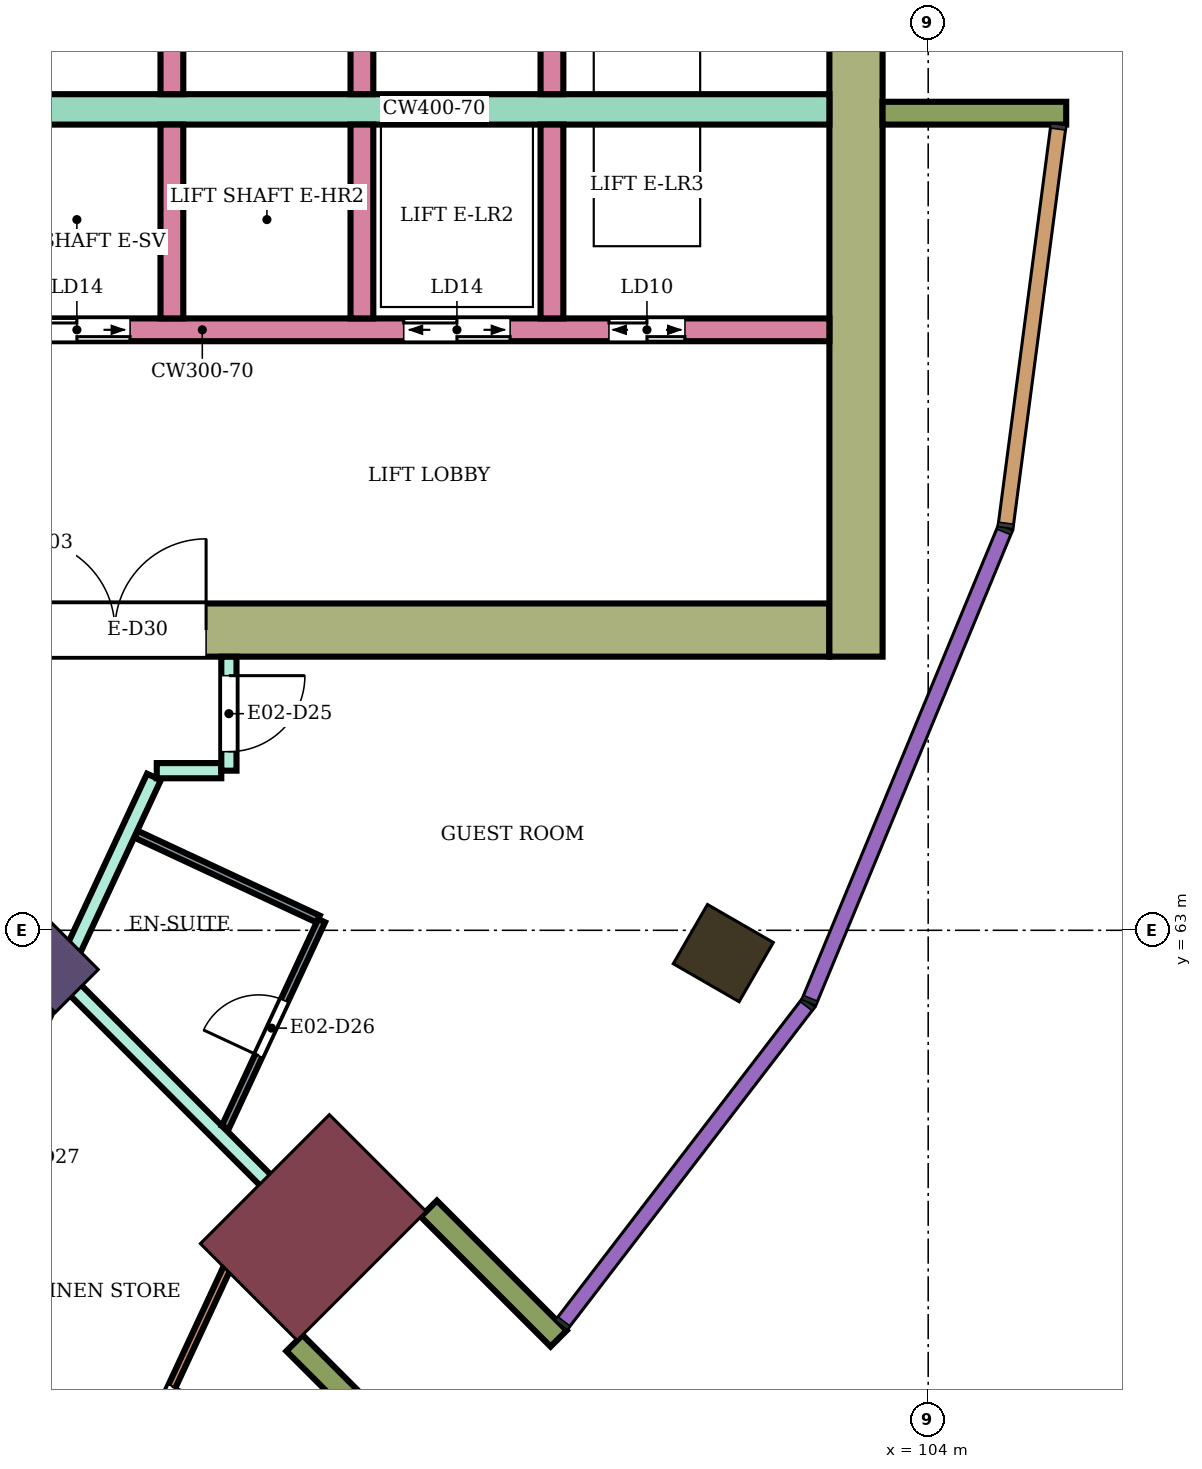
"""IFC4 building model, lengths in metres.
Left out: names, types, materials, properties, quantities, classifications, styles, units other than length and angle.
Written with IfcOpenShell. Run it as: python <this file> out.ifc"""

import sys

from ifc_helpers import new_model, si_unit, direction, frame, frame_2d, origin, origin_2d, place, context, subcontext, project, spatial, rectangle, extrude, element, fill, save


model = new_model("IFC4")
c1 = context("Model", 3, precision=1e-05, world=origin(), true_north=direction((0.0, 1.0)))
c2 = subcontext(c1, "Body", "Model", "MODEL_VIEW")
j1 = project(units=[si_unit("LENGTHUNIT", "METRE"), si_unit("PLANEANGLEUNIT", "RADIAN")], contexts=[c1])
p1 = place(None, origin())
s1 = spatial("IfcSite", under=j1, at=p1, CompositionType="ELEMENT")
p2 = place(p1, origin())
s2 = spatial("IfcBuilding", under=s1, at=p2, CompositionType="ELEMENT")
p3 = place(p2, frame((0.0, 0.0, 126.3)))
s3 = spatial("IfcBuildingStorey", under=s2, at=p3, CompositionType="ELEMENT", Elevation=126.3)
p4 = place(p3, frame((101.304, 62.7, 0.0), z_axis=(0.0, 0.0, 1.0), x_axis=(0.866025403784, -0.5, 0.0)))
e1 = element("IfcColumn", 1, at=p4, inside=s3, PredefinedType="COLUMN", context=c2, shape_type="SweptSolid", body=[
    extrude(rectangle(XDim=1.0, YDim=0.9, at=origin_2d()), origin(), (0.0, 0.0, 1.0), 3.9),
])
p5 = place(p3, frame((92.445, 62.555, 0.0), z_axis=(0.0, 0.0, 1.0), x_axis=(0.707106781187, -0.707106781187, 0.0)))
e2 = element("IfcColumn", 2, at=p5, inside=s3, PredefinedType="COLUMN", context=c2, shape_type="SweptSolid", body=[
    extrude(rectangle(XDim=1.0, YDim=0.8, at=origin_2d()), origin(), (0.0, 0.0, 1.0), 3.9),
])
p6 = place(p3, frame((95.91, 59.09, 0.0), z_axis=(0.0, 0.0, 1.0), x_axis=(0.707106781187, -0.707106781187, 0.0)))
e3 = element("IfcColumn", 3, at=p6, inside=s3, PredefinedType="COLUMN", context=c2, shape_type="SweptSolid", body=[
    extrude(rectangle(XDim=1.8, YDim=2.4, at=origin_2d()), origin(), (0.0, 0.0, 1.0), 3.9),
])
p7 = place(p3, frame((87.9, 66.95, 0.0), z_axis=(0.0, 0.0, 1.0), x_axis=(1.0, 0.0, 0.0)))
e4 = element("IfcWall", 4, at=p7, inside=s3, PredefinedType="SHEAR", context=c2, shape_type="SweptSolid", body=[
    extrude(rectangle(XDim=14.8, YDim=0.7, at=frame_2d((7.4, 0.0))), origin(), (0.0, 0.0, 1.0), 3.58),
])
p8 = place(p7, frame((4.2, 0.0, 0.0)))
e5 = element("IfcOpeningElement", 5, at=p8, cuts=e4, PredefinedType="OPENING", context=c2, shape_type="SweptSolid", body=[
    extrude(rectangle(XDim=2.4, YDim=2.4, at=frame_2d((1.2, 1.2))), frame((0.0, 0.36, 0.0), z_axis=(0.0, -1.0, 0.0), x_axis=(1.0, 0.0, 0.0)), (0.0, 0.0, 1.0), 0.72),
])
p9 = place(p3, frame((103.05, 66.6, 0.0), z_axis=(0.0, 0.0, 1.0), x_axis=(0.0, 1.0, 0.0)))
e6 = element("IfcWall", 6, at=p9, inside=s3, PredefinedType="SHEAR", context=c2, shape_type="SweptSolid", body=[
    extrude(rectangle(XDim=16.8, YDim=0.7, at=frame_2d((8.4, 0.0))), origin(), (0.0, 0.0, 1.0), 3.58),
])
p10 = place(p3, frame((91.7, 73.8, 0.0), z_axis=(0.0, 0.0, 1.0), x_axis=(1.0, 0.0, 0.0)))
e7 = element("IfcWall", 7, at=p10, inside=s3, PredefinedType="SHEAR", context=c2, shape_type="SweptSolid", body=[
    extrude(rectangle(XDim=11.0, YDim=0.4, at=frame_2d((5.5, 0.0))), origin(), (0.0, 0.0, 1.0), 3.58),
])
p11 = place(p3, frame((91.7, 70.9, 0.0), z_axis=(0.0, 0.0, 1.0), x_axis=(1.0, 0.0, 0.0)))
e8 = element("IfcWall", 8, at=p11, inside=s3, PredefinedType="SHEAR", context=c2, shape_type="SweptSolid", body=[
    extrude(rectangle(XDim=11.0, YDim=0.3, at=frame_2d((5.5, 0.0))), origin(), (0.0, 0.0, 1.0), 3.58),
])
p12 = place(p11, frame((0.4, 0.0, 0.0)))
e9 = element("IfcOpeningElement", 9, at=p12, cuts=e8, PredefinedType="OPENING", context=c2, shape_type="SweptSolid", body=[
    extrude(rectangle(XDim=1.4, YDim=2.1, at=frame_2d((0.7, 1.05))), frame((0.0, 0.16, 0.0), z_axis=(0.0, -1.0, 0.0), x_axis=(1.0, 0.0, 0.0)), (0.0, 0.0, 1.0), 0.32),
])
p13 = place(p11, frame((5.4, 0.0, 0.0)))
e10 = element("IfcOpeningElement", 10, at=p13, cuts=e8, PredefinedType="OPENING", context=c2, shape_type="SweptSolid", body=[
    extrude(rectangle(XDim=1.4, YDim=2.1, at=frame_2d((0.7, 1.05))), frame((0.0, 0.16, 0.0), z_axis=(0.0, -1.0, 0.0), x_axis=(1.0, 0.0, 0.0)), (0.0, 0.0, 1.0), 0.32),
])
p14 = place(p11, frame((8.1, 0.0, 0.0)))
e11 = element("IfcOpeningElement", 11, at=p14, cuts=e8, PredefinedType="OPENING", context=c2, shape_type="SweptSolid", body=[
    extrude(rectangle(XDim=1.0, YDim=2.1, at=frame_2d((0.5, 1.05))), frame((0.0, 0.16, 0.0), z_axis=(0.0, -1.0, 0.0), x_axis=(1.0, 0.0, 0.0)), (0.0, 0.0, 1.0), 0.32),
])
for number, where, z_axis, x_axis in (
    (12, (94.05, 74.0, 0.0), (0.0, 0.0, 1.0), (0.0, 1.0, 0.0)),
    (13, (96.55, 74.0, 0.0), (0.0, 0.0, 1.0), (0.0, 1.0, 0.0)),
    (14, (99.05, 74.0, 0.0), (0.0, 0.0, 1.0), (0.0, 1.0, 0.0)),
    (15, (94.05, 71.05, 0.0), (0.0, 0.0, 1.0), (0.0, 1.0, 0.0)),
    (16, (96.55, 71.05, 0.0), (0.0, 0.0, 1.0), (0.0, 1.0, 0.0)),
    (17, (99.05, 71.05, 0.0), (0.0, 0.0, 1.0), (0.0, 1.0, 0.0)),
):
    element("IfcWall", number, at=place(p3, frame(where, z_axis=z_axis, x_axis=x_axis)), inside=s3, PredefinedType="SHEAR", context=c2, shape_type="SweptSolid", body=[
        extrude(rectangle(XDim=2.55, YDim=0.3, at=frame_2d((1.275, 0.0))), origin(), (0.0, 0.0, 1.0), 3.58),
    ])
for number, where, z_axis, x_axis in (
    (18, (103.4, 73.75, 0.0), (0.0, 0.0, 1.0), (1.0, 0.0, 0.0)),
    (19, (95.662, 57.57, 0.0), (0.0, 0.0, 1.0), (0.707, -0.707, 0.0)),
    (20, (97.43, 59.338, 0.0), (0.0, 0.0, 1.0), (0.707, -0.707, 0.0)),
):
    element("IfcWall", number, at=place(p3, frame(where, z_axis=z_axis, x_axis=x_axis)), inside=s3, PredefinedType="NOTDEFINED", context=c2, shape_type="SweptSolid", body=[
        extrude(rectangle(XDim=2.416, YDim=0.3, at=frame_2d((1.208, 0.0))), origin(), (0.0, 0.0, 1.0), 3.9),
    ])
p15 = place(p3, frame((90.16, 57.396, 0.0), z_axis=(0.0, 0.0, 1.0), x_axis=(0.499848624781, -0.86611278267, 0.0)))
e21 = element("IfcWall", 21, at=p15, inside=s3, PredefinedType="PARTITIONING", context=c2, shape_type="SweptSolid", body=[
    extrude(rectangle(XDim=5.472, YDim=0.2, at=frame_2d((2.736, 0.0))), origin(), (0.0, 0.0, 1.0), 3.45),
])
p16 = place(p3, frame((90.346, 57.578, 0.0), z_axis=(0.0, 0.0, 1.0), x_axis=(0.422476720533, 0.906373775331, 0.0)))
e22 = element("IfcWall", 22, at=p16, inside=s3, PredefinedType="PARTITIONING", context=c2, shape_type="SweptSolid", body=[
    extrude(rectangle(XDim=8.208, YDim=0.2, at=frame_2d((4.104, 0.0))), origin(), (0.0, 0.0, 1.0), 3.45),
])
p17 = place(p16, frame((2.223, 0.0, 0.0)))
e23 = element("IfcOpeningElement", 23, at=p17, cuts=e22, PredefinedType="OPENING", context=c2, shape_type="SweptSolid", body=[
    extrude(rectangle(XDim=0.9, YDim=2.1, at=frame_2d((0.45, 1.05))), frame((0.0, 0.11, 0.0), z_axis=(0.0, -1.0, 0.0), x_axis=(1.0, 0.0, 0.0)), (0.0, 0.0, 1.0), 0.22),
])
p18 = place(p3, frame((92.692, 62.303, 0.0), z_axis=(0.0, 0.0, 1.0), x_axis=(0.706943936447, -0.707269588432, 0.0)))
e24 = element("IfcWall", 24, at=p18, inside=s3, PredefinedType="PARTITIONING", context=c2, shape_type="SweptSolid", body=[
    extrude(rectangle(XDim=5.248, YDim=0.2, at=frame_2d((2.624, 0.0))), origin(), (0.0, 0.0, 1.0), 3.45),
])
p19 = place(p3, frame((93.851, 65.1, 0.0), z_axis=(0.0, 0.0, 1.0), x_axis=(1.0, 0.0, 0.0)))
e25 = element("IfcWall", 25, at=p19, inside=s3, PredefinedType="PARTITIONING", context=c2, shape_type="SweptSolid", body=[
    extrude(rectangle(XDim=0.849, YDim=0.2, at=frame_2d((0.424, 0.0))), origin(), (0.0, 0.0, 1.0), 3.45),
])
p20 = place(p3, frame((94.8, 65.1, 0.0), z_axis=(0.0, 0.0, 1.0), x_axis=(0.0, 1.0, 0.0)))
e26 = element("IfcWall", 26, at=p20, inside=s3, PredefinedType="PARTITIONING", context=c2, shape_type="SweptSolid", body=[
    extrude(rectangle(XDim=1.499, YDim=0.2, at=frame_2d((0.75, 0.0))), origin(), (0.0, 0.0, 1.0), 3.45),
])
p21 = place(p20, frame((0.25, 0.0, 0.0)))
e27 = element("IfcOpeningElement", 27, at=p21, cuts=e26, PredefinedType="OPENING", context=c2, shape_type="SweptSolid", body=[
    extrude(rectangle(XDim=1.0, YDim=2.1, at=frame_2d((0.5, 1.05))), frame((0.0, 0.11, 0.0), z_axis=(0.0, -1.0, 0.0), x_axis=(1.0, 0.0, 0.0)), (0.0, 0.0, 1.0), 0.22),
])
p22 = place(p3, frame((92.477, 53.619, 0.0), z_axis=(0.0, 0.0, 1.0), x_axis=(0.421913254756, 0.90663620348, 0.0)))
e28 = element("IfcWall", 28, at=p22, inside=s3, PredefinedType="PARTITIONING", context=c2, shape_type="SweptSolid", body=[
    extrude(rectangle(XDim=6.573, YDim=0.1, at=frame_2d((3.287, 0.0))), origin(), (0.0, 0.0, 1.0), 2.68),
])
p23 = place(p22, frame((2.831, 0.0, 0.0)))
e29 = element("IfcOpeningElement", 29, at=p23, cuts=e28, PredefinedType="OPENING", context=c2, shape_type="SweptSolid", body=[
    extrude(rectangle(XDim=0.9, YDim=2.1, at=frame_2d((0.45, 1.05))), frame((0.0, 0.06, 0.0), z_axis=(0.0, -1.0, 0.0), x_axis=(1.0, 0.0, 0.0)), (0.0, 0.0, 1.0), 0.12),
])
p24 = place(p3, frame((93.582, 64.263, 0.0), z_axis=(0.0, 0.0, 1.0), x_axis=(0.906494794209, -0.422216991691, 0.0)))
e30 = element("IfcWall", 30, at=p24, inside=s3, PredefinedType="PARTITIONING", context=c2, shape_type="SweptSolid", body=[
    extrude(rectangle(XDim=2.64, YDim=0.1, at=frame_2d((1.32, 0.0))), origin(), (0.0, 0.0, 1.0), 3.45),
])
p25 = place(p3, frame((94.753, 60.408, 0.0), z_axis=(0.0, 0.0, 1.0), x_axis=(0.422435455794, 0.906393008406, 0.0)))
e31 = element("IfcWall", 31, at=p25, inside=s3, PredefinedType="PARTITIONING", context=c2, shape_type="SweptSolid", body=[
    extrude(rectangle(XDim=3.0, YDim=0.1, at=frame_2d((1.5, 0.0))), origin(), (0.0, 0.0, 1.0), 3.45),
])
p26 = place(p25, frame((1.04, 0.0, 0.0)))
e32 = element("IfcOpeningElement", 32, at=p26, cuts=e31, PredefinedType="OPENING", context=c2, shape_type="SweptSolid", body=[
    extrude(rectangle(XDim=0.8, YDim=2.1, at=frame_2d((0.4, 1.05))), frame((0.0, 0.06, 0.0), z_axis=(0.0, -1.0, 0.0), x_axis=(1.0, 0.0, 0.0)), (0.0, 0.0, 1.0), 0.12),
])
p27 = place(p21, frame((1.0, 0.0, 0.0), z_axis=(0.0, 0.0, 1.0), x_axis=(-1.0, 0.0, 0.0)))
e33 = element("IfcDoor", 33, at=p27, inside=s3, OperationType="SINGLE_SWING_LEFT", PredefinedType="DOOR", context=c2, shape_type="SweptSolid", body=[
    extrude(rectangle(XDim=1.0, YDim=2.1, at=frame_2d((0.5, 1.05))), frame((0.0, 0.025, 0.0), z_axis=(0.0, -1.0, 0.0), x_axis=(1.0, 0.0, 0.0)), (0.0, 0.0, 1.0), 0.05),
])
fill(e27, e33)
p28 = place(p26, origin())
e34 = element("IfcDoor", 34, at=p28, inside=s3, OperationType="SINGLE_SWING_LEFT", PredefinedType="DOOR", context=c2, shape_type="SweptSolid", body=[
    extrude(rectangle(XDim=0.8, YDim=2.1, at=frame_2d((0.4, 1.05))), frame((0.0, 0.025, 0.0), z_axis=(0.0, -1.0, 0.0), x_axis=(1.0, 0.0, 0.0)), (0.0, 0.0, 1.0), 0.05),
])
fill(e32, e34)
p29 = place(p23, frame((0.9, 0.0, 0.0), z_axis=(0.0, 0.0, 1.0), x_axis=(-1.0, 0.0, 0.0)))
e35 = element("IfcDoor", 35, at=p29, inside=s3, OperationType="SINGLE_SWING_LEFT", PredefinedType="DOOR", context=c2, shape_type="SweptSolid", body=[
    extrude(rectangle(XDim=0.9, YDim=2.1, at=frame_2d((0.45, 1.05))), frame((0.0, 0.025, 0.0), z_axis=(0.0, -1.0, 0.0), x_axis=(1.0, 0.0, 0.0)), (0.0, 0.0, 1.0), 0.05),
])
fill(e29, e35)
p30 = place(p12, origin())
e36 = element("IfcDoor", 36, at=p30, inside=s3, OperationType="DOUBLE_DOOR_SLIDING", PredefinedType="DOOR", context=c2, shape_type="SweptSolid", body=[
    extrude(rectangle(XDim=1.4, YDim=2.1, at=frame_2d((0.7, 1.05))), frame((0.0, 0.025, 0.0), z_axis=(0.0, -1.0, 0.0), x_axis=(1.0, 0.0, 0.0)), (0.0, 0.0, 1.0), 0.05),
])
fill(e9, e36)
p31 = place(p13, origin())
e37 = element("IfcDoor", 37, at=p31, inside=s3, OperationType="DOUBLE_DOOR_SLIDING", PredefinedType="DOOR", context=c2, shape_type="SweptSolid", body=[
    extrude(rectangle(XDim=1.4, YDim=2.1, at=frame_2d((0.7, 1.05))), frame((0.0, 0.025, 0.0), z_axis=(0.0, -1.0, 0.0), x_axis=(1.0, 0.0, 0.0)), (0.0, 0.0, 1.0), 0.05),
])
fill(e10, e37)
p32 = place(p14, origin())
e38 = element("IfcDoor", 38, at=p32, inside=s3, OperationType="DOUBLE_DOOR_SLIDING", PredefinedType="DOOR", context=c2, shape_type="SweptSolid", body=[
    extrude(rectangle(XDim=1.0, YDim=2.1, at=frame_2d((0.5, 1.05))), frame((0.0, 0.025, 0.0), z_axis=(0.0, -1.0, 0.0), x_axis=(1.0, 0.0, 0.0)), (0.0, 0.0, 1.0), 0.05),
])
fill(e11, e38)
p33 = place(p8, origin())
e39 = element("IfcDoor", 39, at=p33, inside=s3, OperationType="DOUBLE_DOOR_SINGLE_SWING", PredefinedType="DOOR", context=c2, shape_type="SweptSolid", body=[
    extrude(rectangle(XDim=2.4, YDim=2.4, at=frame_2d((1.2, 1.2))), frame((0.0, 0.025, 0.0), z_axis=(0.0, -1.0, 0.0), x_axis=(1.0, 0.0, 0.0)), (0.0, 0.0, 1.0), 0.05),
])
fill(e5, e39)
save(model, sys.argv[1])
